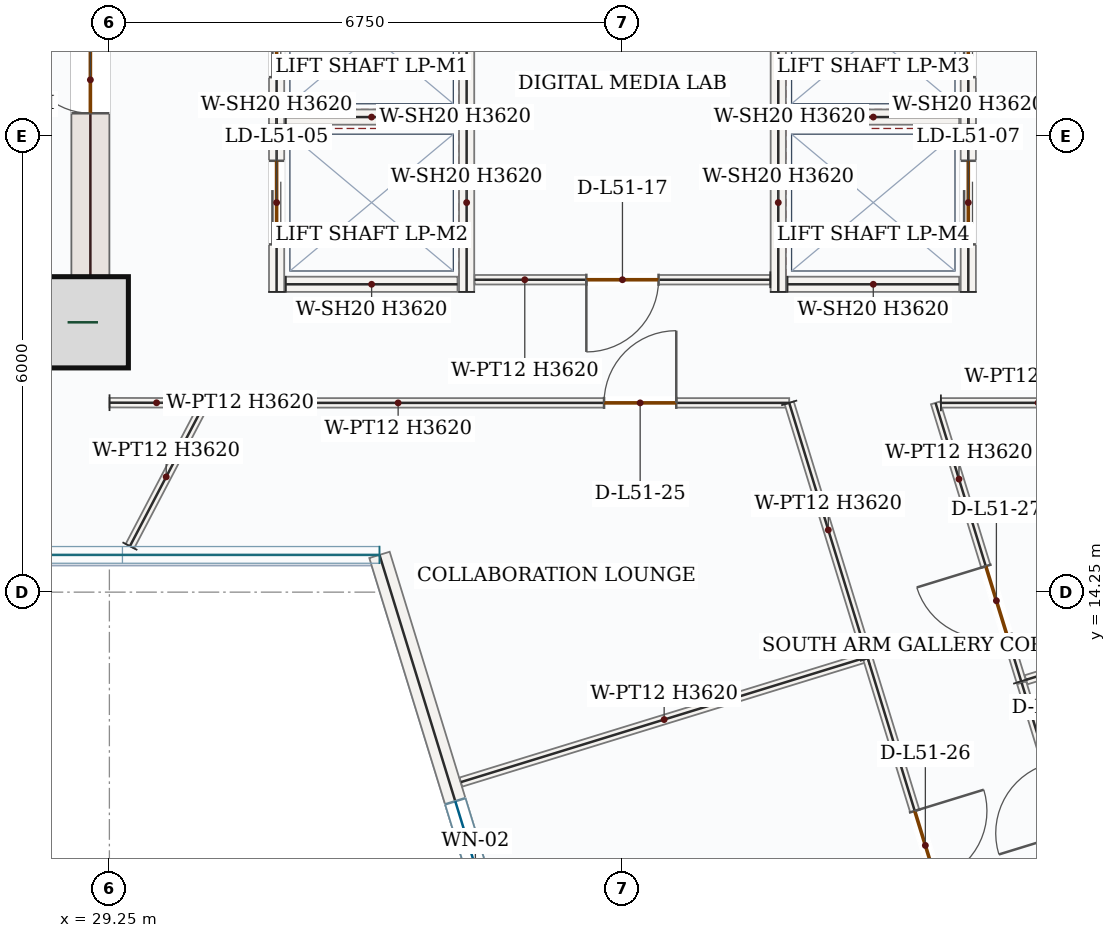
"""IFC4 building model, lengths in metres.
Left out: names, types, materials, properties, quantities, classifications, styles, units other than length and angle.
Written with IfcOpenShell. Run it as: python <this file> out.ifc"""

import sys

from ifc_helpers import new_model, si_unit, direction, frame, frame_2d, origin, origin_2d, place, context, subcontext, project, spatial, rectangle, extrude, source, transform, mapped, element, fill, save


model = new_model("IFC4")
c1 = context("Model", 3, precision=1e-05, world=origin(), true_north=direction((0.0, 1.0)))
c2 = subcontext(c1, "Body", "Model", "MODEL_VIEW")
j1 = project(units=[si_unit("LENGTHUNIT", "METRE"), si_unit("PLANEANGLEUNIT", "RADIAN")], contexts=[c1])
p1 = place(None, origin())
s1 = spatial("IfcSite", under=j1, at=p1, CompositionType="ELEMENT")
p2 = place(p1, origin())
s2 = spatial("IfcBuilding", under=s1, at=p2, CompositionType="ELEMENT")
p3 = place(p2, frame((0.0, 0.0, 217.5)))
s3 = spatial("IfcBuildingStorey", under=s2, at=p3, CompositionType="ELEMENT", Elevation=217.5)
p4 = place(p3, frame((29.0, 17.4, 0.0), z_axis=(0.0, 0.0, 1.0), x_axis=(0.0, 1.0, 0.0)))
e1 = element("IfcWall", 1, at=p4, inside=s3, PredefinedType="SHEAR", context=c2, shape_type="SweptSolid", body=[
    extrude(rectangle(XDim=8.55, YDim=0.5, at=frame_2d((4.275, 0.0))), origin(), (0.0, 0.0, 1.0), 3.62),
])
p5 = place(p4, frame((6.65, 0.0, 0.0)))
e2 = element("IfcOpeningElement", 2, at=p5, cuts=e1, PredefinedType="OPENING", context=c2, shape_type="SweptSolid", body=[
    extrude(rectangle(XDim=1.1, YDim=2.2, at=frame_2d((0.55, 1.1))), frame((0.0, 0.26, 0.0), z_axis=(0.0, -1.0, 0.0), x_axis=(1.0, 0.0, 0.0)), (0.0, 0.0, 1.0), 0.52),
])
p6 = place(p4, frame((3.15, 0.0, 0.0)))
e3 = element("IfcOpeningElement", 3, at=p6, cuts=e1, PredefinedType="OPENING", context=c2, shape_type="SweptSolid", body=[
    extrude(rectangle(XDim=0.88, YDim=2.1, at=frame_2d((0.44, 1.05))), frame((0.0, 0.26, 0.0), z_axis=(0.0, -1.0, 0.0), x_axis=(1.0, 0.0, 0.0)), (0.0, 0.0, 1.0), 0.52),
])
m1 = source(origin(), c2, "Body", "SweptSolid", [
    extrude(rectangle(XDim=7.0, YDim=0.5, at=frame_2d((3.5, 0.0))), origin(), (0.0, 0.0, 1.0), 3.62),
])
p7 = place(p3, frame((21.75, 17.65, 0.0), z_axis=(0.0, 0.0, 1.0), x_axis=(1.0, 0.0, 0.0)))
e4 = element("IfcWall", 4, at=p7, inside=s3, PredefinedType="SHEAR", context=c2, shape_type="MappedRepresentation", body=[
    mapped(m1, transform((0.0, 0.0, 0.0), x_axis=(1.0, 0.0, 0.0), y_axis=(0.0, 1.0, 0.0), z_axis=(0.0, 0.0, 1.0), scale=1.0)),
])
m2 = source(origin(), c2, "Body", "SweptSolid", [
    extrude(rectangle(XDim=1.2, YDim=1.2, at=origin_2d()), origin(), (0.0, 0.0, 1.0), 3.9),
])
p8 = place(p3, frame((28.9, 17.8, 0.0), z_axis=(0.0, 0.0, 1.0), x_axis=(1.0, 0.0, 0.0)))
e5 = element("IfcColumn", 5, at=p8, inside=s3, PredefinedType="COLUMN", context=c2, shape_type="MappedRepresentation", body=[
    mapped(m2, transform((0.0, 0.0, 0.0), x_axis=(1.0, 0.0, 0.0), y_axis=(0.0, 1.0, 0.0), z_axis=(0.0, 0.0, 1.0), scale=1.0)),
])
p9 = place(p3, frame((35.327, 6.538, 0.0), z_axis=(0.0, 0.0, 1.0), x_axis=(-0.294019877333, 0.955799305154, 0.0)))
e6 = element("IfcWall", 6, at=p9, inside=s3, PredefinedType="SOLIDWALL", context=c2, shape_type="SweptSolid", body=[
    extrude(rectangle(XDim=8.582, YDim=0.28, at=frame_2d((4.291, 0.0))), origin(), (0.0, 0.0, 1.0), 3.62),
])
p10 = place(p9, frame((3.391, 0.0, 0.85)))
e7 = element("IfcOpeningElement", 7, at=p10, cuts=e6, PredefinedType="OPENING", context=c2, shape_type="SweptSolid", body=[
    extrude(rectangle(XDim=1.8, YDim=1.75, at=frame_2d((0.9, 0.875))), frame((0.0, 0.15, 0.0), z_axis=(0.0, -1.0, 0.0), x_axis=(1.0, 0.0, 0.0)), (0.0, 0.0, 1.0), 0.3),
])
p11 = place(p3, frame((31.45, 20.4, 0.0), z_axis=(0.0, 0.0, 1.0), x_axis=(0.0, 1.0, 0.0)))
e8 = element("IfcWall", 8, at=p11, inside=s3, PredefinedType="SOLIDWALL", context=c2, shape_type="SweptSolid", body=[
    extrude(rectangle(XDim=2.35, YDim=0.2, at=frame_2d((1.175, 0.0))), origin(), (0.0, 0.0, 1.0), 3.62),
])
p12 = place(p11, frame((0.625, 0.0, 0.0)))
e9 = element("IfcOpeningElement", 9, at=p12, cuts=e8, PredefinedType="OPENING", context=c2, shape_type="SweptSolid", body=[
    extrude(rectangle(XDim=1.1, YDim=2.15, at=frame_2d((0.55, 1.075))), frame((0.0, 0.11, 0.0), z_axis=(0.0, -1.0, 0.0), x_axis=(1.0, 0.0, 0.0)), (0.0, 0.0, 1.0), 0.22),
])
m3 = source(origin(), c2, "Body", "SweptSolid", [
    extrude(rectangle(XDim=2.35, YDim=0.2, at=frame_2d((1.175, 0.0))), origin(), (0.0, 0.0, 1.0), 3.62),
])
p13 = place(p3, frame((33.95, 20.4, 0.0), z_axis=(0.0, 0.0, 1.0), x_axis=(0.0, 1.0, 0.0)))
e10 = element("IfcWall", 10, at=p13, inside=s3, PredefinedType="SOLIDWALL", context=c2, shape_type="MappedRepresentation", body=[
    mapped(m3, transform((0.0, 0.0, 0.0), x_axis=(1.0, 0.0, 0.0), y_axis=(0.0, 1.0, 0.0), z_axis=(0.0, 0.0, 1.0), scale=1.0)),
])
m4 = source(origin(), c2, "Body", "SweptSolid", [
    extrude(rectangle(XDim=2.26, YDim=0.2, at=frame_2d((1.13, 0.0))), origin(), (0.0, 0.0, 1.0), 3.62),
])
p14 = place(p3, frame((31.57, 20.5, 0.0), z_axis=(0.0, 0.0, 1.0), x_axis=(1.0, 0.0, 0.0)))
e11 = element("IfcWall", 11, at=p14, inside=s3, PredefinedType="SOLIDWALL", context=c2, shape_type="MappedRepresentation", body=[
    mapped(m4, transform((0.0, 0.0, 0.0), x_axis=(1.0, 0.0, 0.0), y_axis=(0.0, 1.0, 0.0), z_axis=(0.0, 0.0, 1.0), scale=1.0)),
])
p15 = place(p3, frame((31.45, 18.2, 0.0), z_axis=(0.0, 0.0, 1.0), x_axis=(0.0, 1.0, 0.0)))
e12 = element("IfcWall", 12, at=p15, inside=s3, PredefinedType="SOLIDWALL", context=c2, shape_type="SweptSolid", body=[
    extrude(rectangle(XDim=2.35, YDim=0.2, at=frame_2d((1.175, 0.0))), origin(), (0.0, 0.0, 1.0), 3.62),
])
p16 = place(p15, frame((0.625, 0.0, 0.0)))
e13 = element("IfcOpeningElement", 13, at=p16, cuts=e12, PredefinedType="OPENING", context=c2, shape_type="SweptSolid", body=[
    extrude(rectangle(XDim=1.1, YDim=2.15, at=frame_2d((0.55, 1.075))), frame((0.0, 0.11, 0.0), z_axis=(0.0, -1.0, 0.0), x_axis=(1.0, 0.0, 0.0)), (0.0, 0.0, 1.0), 0.22),
])
p17 = place(p3, frame((33.95, 18.2, 0.0), z_axis=(0.0, 0.0, 1.0), x_axis=(0.0, 1.0, 0.0)))
e14 = element("IfcWall", 14, at=p17, inside=s3, PredefinedType="SOLIDWALL", context=c2, shape_type="MappedRepresentation", body=[
    mapped(m3, transform((0.0, 0.0, 0.0), x_axis=(1.0, 0.0, 0.0), y_axis=(0.0, 1.0, 0.0), z_axis=(0.0, 0.0, 1.0), scale=1.0)),
])
p18 = place(p3, frame((31.57, 18.3, 0.0), z_axis=(0.0, 0.0, 1.0), x_axis=(1.0, 0.0, 0.0)))
e15 = element("IfcWall", 15, at=p18, inside=s3, PredefinedType="SOLIDWALL", context=c2, shape_type="MappedRepresentation", body=[
    mapped(m4, transform((0.0, 0.0, 0.0), x_axis=(1.0, 0.0, 0.0), y_axis=(0.0, 1.0, 0.0), z_axis=(0.0, 0.0, 1.0), scale=1.0)),
])
p19 = place(p3, frame((38.05, 20.4, 0.0), z_axis=(0.0, 0.0, 1.0), x_axis=(0.0, 1.0, 0.0)))
e16 = element("IfcWall", 16, at=p19, inside=s3, PredefinedType="SOLIDWALL", context=c2, shape_type="MappedRepresentation", body=[
    mapped(m3, transform((0.0, 0.0, 0.0), x_axis=(1.0, 0.0, 0.0), y_axis=(0.0, 1.0, 0.0), z_axis=(0.0, 0.0, 1.0), scale=1.0)),
])
p20 = place(p3, frame((40.55, 20.4, 0.0), z_axis=(0.0, 0.0, 1.0), x_axis=(0.0, 1.0, 0.0)))
e17 = element("IfcWall", 17, at=p20, inside=s3, PredefinedType="SOLIDWALL", context=c2, shape_type="SweptSolid", body=[
    extrude(rectangle(XDim=2.35, YDim=0.2, at=frame_2d((1.175, 0.0))), origin(), (0.0, 0.0, 1.0), 3.62),
])
p21 = place(p20, frame((0.625, 0.0, 0.0)))
e18 = element("IfcOpeningElement", 18, at=p21, cuts=e17, PredefinedType="OPENING", context=c2, shape_type="SweptSolid", body=[
    extrude(rectangle(XDim=1.1, YDim=2.15, at=frame_2d((0.55, 1.075))), frame((0.0, 0.11, 0.0), z_axis=(0.0, -1.0, 0.0), x_axis=(1.0, 0.0, 0.0)), (0.0, 0.0, 1.0), 0.22),
])
p22 = place(p3, frame((38.17, 20.5, 0.0), z_axis=(0.0, 0.0, 1.0), x_axis=(1.0, 0.0, 0.0)))
e19 = element("IfcWall", 19, at=p22, inside=s3, PredefinedType="SOLIDWALL", context=c2, shape_type="MappedRepresentation", body=[
    mapped(m4, transform((0.0, 0.0, 0.0), x_axis=(1.0, 0.0, 0.0), y_axis=(0.0, 1.0, 0.0), z_axis=(0.0, 0.0, 1.0), scale=1.0)),
])
p23 = place(p3, frame((38.05, 18.2, 0.0), z_axis=(0.0, 0.0, 1.0), x_axis=(0.0, 1.0, 0.0)))
e20 = element("IfcWall", 20, at=p23, inside=s3, PredefinedType="SOLIDWALL", context=c2, shape_type="MappedRepresentation", body=[
    mapped(m3, transform((0.0, 0.0, 0.0), x_axis=(1.0, 0.0, 0.0), y_axis=(0.0, 1.0, 0.0), z_axis=(0.0, 0.0, 1.0), scale=1.0)),
])
p24 = place(p3, frame((40.55, 18.2, 0.0), z_axis=(0.0, 0.0, 1.0), x_axis=(0.0, 1.0, 0.0)))
e21 = element("IfcWall", 21, at=p24, inside=s3, PredefinedType="SOLIDWALL", context=c2, shape_type="SweptSolid", body=[
    extrude(rectangle(XDim=2.35, YDim=0.2, at=frame_2d((1.175, 0.0))), origin(), (0.0, 0.0, 1.0), 3.62),
])
p25 = place(p24, frame((0.625, 0.0, 0.0)))
e22 = element("IfcOpeningElement", 22, at=p25, cuts=e21, PredefinedType="OPENING", context=c2, shape_type="SweptSolid", body=[
    extrude(rectangle(XDim=1.1, YDim=2.15, at=frame_2d((0.55, 1.075))), frame((0.0, 0.11, 0.0), z_axis=(0.0, -1.0, 0.0), x_axis=(1.0, 0.0, 0.0)), (0.0, 0.0, 1.0), 0.22),
])
p26 = place(p3, frame((38.17, 18.3, 0.0), z_axis=(0.0, 0.0, 1.0), x_axis=(1.0, 0.0, 0.0)))
e23 = element("IfcWall", 23, at=p26, inside=s3, PredefinedType="SOLIDWALL", context=c2, shape_type="MappedRepresentation", body=[
    mapped(m4, transform((0.0, 0.0, 0.0), x_axis=(1.0, 0.0, 0.0), y_axis=(0.0, 1.0, 0.0), z_axis=(0.0, 0.0, 1.0), scale=1.0)),
])
p27 = place(p3, frame((37.945, 18.36, 0.0), z_axis=(0.0, 0.0, 1.0), x_axis=(-1.0, 0.0, 0.0)))
e24 = element("IfcWall", 24, at=p27, inside=s3, PredefinedType="PARTITIONING", context=c2, shape_type="SweptSolid", body=[
    extrude(rectangle(XDim=3.89, YDim=0.125, at=frame_2d((1.945, 0.0))), origin(), (0.0, 0.0, 1.0), 3.62),
])
p28 = place(p27, frame((1.47, 0.0, 0.0)))
e25 = element("IfcOpeningElement", 25, at=p28, cuts=e24, PredefinedType="OPENING", context=c2, shape_type="SweptSolid", body=[
    extrude(rectangle(XDim=0.95, YDim=2.15, at=frame_2d((0.475, 1.075))), frame((0.0, 0.073, 0.0), z_axis=(0.0, -1.0, 0.0), x_axis=(1.0, 0.0, 0.0)), (0.0, 0.0, 1.0), 0.145),
])
p29 = place(p3, frame((41.246, 13.077, 0.0), z_axis=(0.0, 0.0, 1.0), x_axis=(-0.294050037582, 0.955790026836, 0.0)))
e26 = element("IfcWall", 26, at=p29, inside=s3, PredefinedType="PARTITIONING", context=c2, shape_type="SweptSolid", body=[
    extrude(rectangle(XDim=3.833, YDim=0.125, at=frame_2d((1.916, 0.0))), origin(), (0.0, 0.0, 1.0), 3.62),
])
p30 = place(p29, frame((0.634, 0.0, 0.0)))
e27 = element("IfcOpeningElement", 27, at=p30, cuts=e26, PredefinedType="OPENING", context=c2, shape_type="SweptSolid", body=[
    extrude(rectangle(XDim=0.95, YDim=2.15, at=frame_2d((0.475, 1.075))), frame((0.0, 0.073, 0.0), z_axis=(0.0, -1.0, 0.0), x_axis=(1.0, 0.0, 0.0)), (0.0, 0.0, 1.0), 0.145),
])
m5 = source(origin(), c2, "Body", "SweptSolid", [
    extrude(rectangle(XDim=2.557, YDim=0.125, at=frame_2d((1.278, 0.0))), origin(), (0.0, 0.0, 1.0), 3.079),
])
p31 = place(p3, frame((40.19, 16.74, 0.0), z_axis=(0.0, 0.0, 1.0), x_axis=(0.999999886036, 0.000477418068, 0.0)))
e28 = element("IfcWall", 28, at=p31, inside=s3, PredefinedType="PARTITIONING", context=c2, shape_type="MappedRepresentation", body=[
    mapped(m5, transform((0.0, 0.0, 0.0), x_axis=(1.0, 0.0, 0.0), y_axis=(0.0, 1.0, 0.0), z_axis=(0.0, 0.0, 1.0), scale=1.0)),
])
m6 = source(origin(), c2, "Body", "SweptSolid", [
    extrude(rectangle(XDim=5.68, YDim=0.125, at=frame_2d((2.84, 0.0))), origin(), (0.0, 0.0, 1.0), 3.079),
])
p32 = place(p3, frame((46.74, 14.767, 0.0), z_axis=(0.0, 0.0, 1.0), x_axis=(-0.955800379324, -0.294016385402, 0.0)))
e29 = element("IfcWall", 29, at=p32, inside=s3, PredefinedType="PARTITIONING", context=c2, shape_type="MappedRepresentation", body=[
    mapped(m6, transform((0.0, 0.0, 0.0), x_axis=(1.0, 0.0, 0.0), y_axis=(0.0, 1.0, 0.0), z_axis=(0.0, 0.0, 1.0), scale=1.0)),
])
p33 = place(p3, frame((30.49, 16.74, 0.0), z_axis=(0.0, 0.0, 1.0), x_axis=(1.0, 0.0, 0.0)))
e30 = element("IfcWall", 30, at=p33, inside=s3, PredefinedType="PARTITIONING", context=c2, shape_type="SweptSolid", body=[
    extrude(rectangle(XDim=7.704, YDim=0.125, at=frame_2d((3.852, 0.0))), origin(), (0.0, 0.0, 1.0), 3.62),
])
p34 = place(p33, frame((5.268, 0.0, 0.0)))
e31 = element("IfcOpeningElement", 31, at=p34, cuts=e30, PredefinedType="OPENING", context=c2, shape_type="SweptSolid", body=[
    extrude(rectangle(XDim=0.95, YDim=2.15, at=frame_2d((0.475, 1.075))), frame((0.0, 0.073, 0.0), z_axis=(0.0, -1.0, 0.0), x_axis=(1.0, 0.0, 0.0)), (0.0, 0.0, 1.0), 0.145),
])
m7 = source(origin(), c2, "Body", "SweptSolid", [
    extrude(rectangle(XDim=3.498, YDim=0.125, at=frame_2d((1.749, 0.0))), origin(), (0.0, 0.0, 1.0), 3.62),
])
p35 = place(p3, frame((38.194, 16.74, 0.0), z_axis=(0.0, 0.0, 1.0), x_axis=(0.294012288782, -0.955801639487, 0.0)))
e32 = element("IfcWall", 32, at=p35, inside=s3, PredefinedType="PARTITIONING", context=c2, shape_type="MappedRepresentation", body=[
    mapped(m7, transform((0.0, 0.0, 0.0), x_axis=(1.0, 0.0, 0.0), y_axis=(0.0, 1.0, 0.0), z_axis=(0.0, 0.0, 1.0), scale=1.0)),
])
m8 = source(origin(), c2, "Body", "SweptSolid", [
    extrude(rectangle(XDim=5.595, YDim=0.125, at=frame_2d((2.797, 0.0))), origin(), (0.0, 0.0, 1.0), 3.62),
])
p36 = place(p3, frame((39.222, 13.396, 0.0), z_axis=(0.0, 0.0, 1.0), x_axis=(-0.955787499516, -0.294058252339, 0.0)))
e33 = element("IfcWall", 33, at=p36, inside=s3, PredefinedType="PARTITIONING", context=c2, shape_type="MappedRepresentation", body=[
    mapped(m8, transform((0.0, 0.0, 0.0), x_axis=(1.0, 0.0, 0.0), y_axis=(0.0, 1.0, 0.0), z_axis=(0.0, 0.0, 1.0), scale=1.0)),
])
m9 = source(origin(), c2, "Body", "SweptSolid", [
    extrude(rectangle(XDim=2.058, YDim=0.125, at=frame_2d((1.029, 0.0))), origin(), (0.0, 0.0, 1.0), 3.62),
])
p37 = place(p3, frame((29.52, 14.855, 0.0), z_axis=(0.0, 0.0, 1.0), x_axis=(0.463745427916, 0.885968497232, 0.0)))
e34 = element("IfcWall", 34, at=p37, inside=s3, PredefinedType="PARTITIONING", context=c2, shape_type="MappedRepresentation", body=[
    mapped(m9, transform((0.0, 0.0, 0.0), x_axis=(1.0, 0.0, 0.0), y_axis=(0.0, 1.0, 0.0), z_axis=(0.0, 0.0, 1.0), scale=1.0)),
])
p38 = place(p3, frame((43.029, 7.28, 0.0), z_axis=(0.0, 0.0, 1.0), x_axis=(-0.294054630952, 0.955788613667, 0.0)))
e35 = element("IfcWall", 35, at=p38, inside=s3, PredefinedType="PARTITIONING", context=c2, shape_type="SweptSolid", body=[
    extrude(rectangle(XDim=6.045, YDim=0.125, at=frame_2d((3.022, 0.0))), origin(), (0.0, 0.0, 1.0), 3.62),
])
p39 = place(p38, frame((3.974, 0.0, 0.0)))
e36 = element("IfcOpeningElement", 36, at=p39, cuts=e35, PredefinedType="OPENING", context=c2, shape_type="SweptSolid", body=[
    extrude(rectangle(XDim=0.95, YDim=2.15, at=frame_2d((0.475, 1.075))), frame((0.0, 0.073, 0.0), z_axis=(0.0, -1.0, 0.0), x_axis=(1.0, 0.0, 0.0)), (0.0, 0.0, 1.0), 0.145),
])
p40 = place(p3, frame((39.229, 13.377, 0.0), z_axis=(0.0, 0.0, 1.0), x_axis=(0.294016682873, -0.955800287818, 0.0)))
e37 = element("IfcWall", 37, at=p40, inside=s3, PredefinedType="PARTITIONING", context=c2, shape_type="SweptSolid", body=[
    extrude(rectangle(XDim=6.945, YDim=0.125, at=frame_2d((3.473, 0.0))), origin(), (0.0, 0.0, 1.0), 3.62),
])
p41 = place(p40, frame((2.098, 0.0, 0.0)))
e38 = element("IfcOpeningElement", 38, at=p41, cuts=e37, PredefinedType="OPENING", context=c2, shape_type="SweptSolid", body=[
    extrude(rectangle(XDim=0.95, YDim=2.15, at=frame_2d((0.475, 1.075))), frame((0.0, 0.073, 0.0), z_axis=(0.0, -1.0, 0.0), x_axis=(1.0, 0.0, 0.0)), (0.0, 0.0, 1.0), 0.145),
])
m10 = source(origin(), c2, "Body", "SweptSolid", [
    extrude(rectangle(XDim=1.238, YDim=0.125, at=frame_2d((0.619, 0.0))), origin(), (0.0, 0.0, 1.0), 3.62),
])
p42 = place(p3, frame((29.252, 16.743, 0.0), z_axis=(0.0, 0.0, 1.0), x_axis=(0.9999976473, -0.002169192293, 0.0)))
e39 = element("IfcWall", 39, at=p42, inside=s3, PredefinedType="PARTITIONING", context=c2, shape_type="MappedRepresentation", body=[
    mapped(m10, transform((0.0, 0.0, 0.0), x_axis=(1.0, 0.0, 0.0), y_axis=(0.0, 1.0, 0.0), z_axis=(0.0, 0.0, 1.0), scale=1.0)),
])
m11 = source(origin(), c2, "Body", "SweptSolid", [
    extrude(rectangle(XDim=1.8, YDim=1.75, at=frame_2d((0.9, 0.875))), frame((0.0, 0.03, 0.0), z_axis=(0.0, -1.0, 0.0), x_axis=(1.0, 0.0, 0.0)), (0.0, 0.0, 1.0), 0.06),
])
p43 = place(p10, origin())
e40 = element("IfcWindow", 40, at=p43, inside=s3, PartitioningType="DOUBLE_PANEL_VERTICAL", PredefinedType="WINDOW", context=c2, shape_type="MappedRepresentation", body=[
    mapped(m11, transform((0.0, 0.0, 0.0), x_axis=(1.0, 0.0, 0.0), y_axis=(0.0, 1.0, 0.0), z_axis=(0.0, 0.0, 1.0), scale=1.0)),
])
fill(e7, e40)
m12 = source(origin(), c2, "Body", "SweptSolid", [
    extrude(rectangle(XDim=0.88, YDim=2.1, at=frame_2d((0.44, 1.05))), frame((0.0, 0.025, 0.0), z_axis=(0.0, -1.0, 0.0), x_axis=(1.0, 0.0, 0.0)), (0.0, 0.0, 1.0), 0.05),
])
p44 = place(p6, origin())
e41 = element("IfcDoor", 41, at=p44, inside=s3, OperationType="SINGLE_SWING_RIGHT", PredefinedType="DOOR", context=c2, shape_type="MappedRepresentation", body=[
    mapped(m12, transform((0.0, 0.0, 0.0), x_axis=(1.0, 0.0, 0.0), y_axis=(0.0, 1.0, 0.0), z_axis=(0.0, 0.0, 1.0), scale=1.0)),
])
fill(e3, e41)
m13 = source(origin(), c2, "Body", "SweptSolid", [
    extrude(rectangle(XDim=1.1, YDim=2.15, at=frame_2d((0.55, 1.075))), frame((0.0, 0.025, 0.0), z_axis=(0.0, -1.0, 0.0), x_axis=(1.0, 0.0, 0.0)), (0.0, 0.0, 1.0), 0.05),
])
p45 = place(p12, origin())
e42 = element("IfcDoor", 42, at=p45, inside=s3, OperationType="DOUBLE_DOOR_SLIDING", PredefinedType="DOOR", context=c2, shape_type="MappedRepresentation", body=[
    mapped(m13, transform((0.0, 0.0, 0.0), x_axis=(1.0, 0.0, 0.0), y_axis=(0.0, 1.0, 0.0), z_axis=(0.0, 0.0, 1.0), scale=1.0)),
])
fill(e9, e42)
p46 = place(p16, origin())
e43 = element("IfcDoor", 43, at=p46, inside=s3, OperationType="DOUBLE_DOOR_SLIDING", PredefinedType="DOOR", context=c2, shape_type="MappedRepresentation", body=[
    mapped(m13, transform((0.0, 0.0, 0.0), x_axis=(1.0, 0.0, 0.0), y_axis=(0.0, 1.0, 0.0), z_axis=(0.0, 0.0, 1.0), scale=1.0)),
])
fill(e13, e43)
p47 = place(p21, origin())
e44 = element("IfcDoor", 44, at=p47, inside=s3, OperationType="DOUBLE_DOOR_SLIDING", PredefinedType="DOOR", context=c2, shape_type="MappedRepresentation", body=[
    mapped(m13, transform((0.0, 0.0, 0.0), x_axis=(1.0, 0.0, 0.0), y_axis=(0.0, 1.0, 0.0), z_axis=(0.0, 0.0, 1.0), scale=1.0)),
])
fill(e18, e44)
p48 = place(p25, origin())
e45 = element("IfcDoor", 45, at=p48, inside=s3, OperationType="DOUBLE_DOOR_SLIDING", PredefinedType="DOOR", context=c2, shape_type="MappedRepresentation", body=[
    mapped(m13, transform((0.0, 0.0, 0.0), x_axis=(1.0, 0.0, 0.0), y_axis=(0.0, 1.0, 0.0), z_axis=(0.0, 0.0, 1.0), scale=1.0)),
])
fill(e22, e45)
m14 = source(origin(), c2, "Body", "SweptSolid", [
    extrude(rectangle(XDim=0.95, YDim=2.15, at=frame_2d((0.475, 1.075))), frame((0.0, 0.025, 0.0), z_axis=(0.0, -1.0, 0.0), x_axis=(1.0, 0.0, 0.0)), (0.0, 0.0, 1.0), 0.05),
])
p49 = place(p28, origin())
e46 = element("IfcDoor", 46, at=p49, inside=s3, OperationType="SINGLE_SWING_RIGHT", PredefinedType="DOOR", context=c2, shape_type="MappedRepresentation", body=[
    mapped(m14, transform((0.0, 0.0, 0.0), x_axis=(1.0, 0.0, 0.0), y_axis=(0.0, 1.0, 0.0), z_axis=(0.0, 0.0, 1.0), scale=1.0)),
])
fill(e25, e46)
p50 = place(p34, origin())
e47 = element("IfcDoor", 47, at=p50, inside=s3, OperationType="SINGLE_SWING_RIGHT", PredefinedType="DOOR", context=c2, shape_type="MappedRepresentation", body=[
    mapped(m14, transform((0.0, 0.0, 0.0), x_axis=(1.0, 0.0, 0.0), y_axis=(0.0, 1.0, 0.0), z_axis=(0.0, 0.0, 1.0), scale=1.0)),
])
fill(e31, e47)
p51 = place(p41, origin())
e48 = element("IfcDoor", 48, at=p51, inside=s3, OperationType="SINGLE_SWING_LEFT", PredefinedType="DOOR", context=c2, shape_type="MappedRepresentation", body=[
    mapped(m14, transform((0.0, 0.0, 0.0), x_axis=(1.0, 0.0, 0.0), y_axis=(0.0, 1.0, 0.0), z_axis=(0.0, 0.0, 1.0), scale=1.0)),
])
fill(e38, e48)
p52 = place(p30, origin())
e49 = element("IfcDoor", 49, at=p52, inside=s3, OperationType="SINGLE_SWING_RIGHT", PredefinedType="DOOR", context=c2, shape_type="MappedRepresentation", body=[
    mapped(m14, transform((0.0, 0.0, 0.0), x_axis=(1.0, 0.0, 0.0), y_axis=(0.0, 1.0, 0.0), z_axis=(0.0, 0.0, 1.0), scale=1.0)),
])
fill(e27, e49)
save(model, sys.argv[1])
